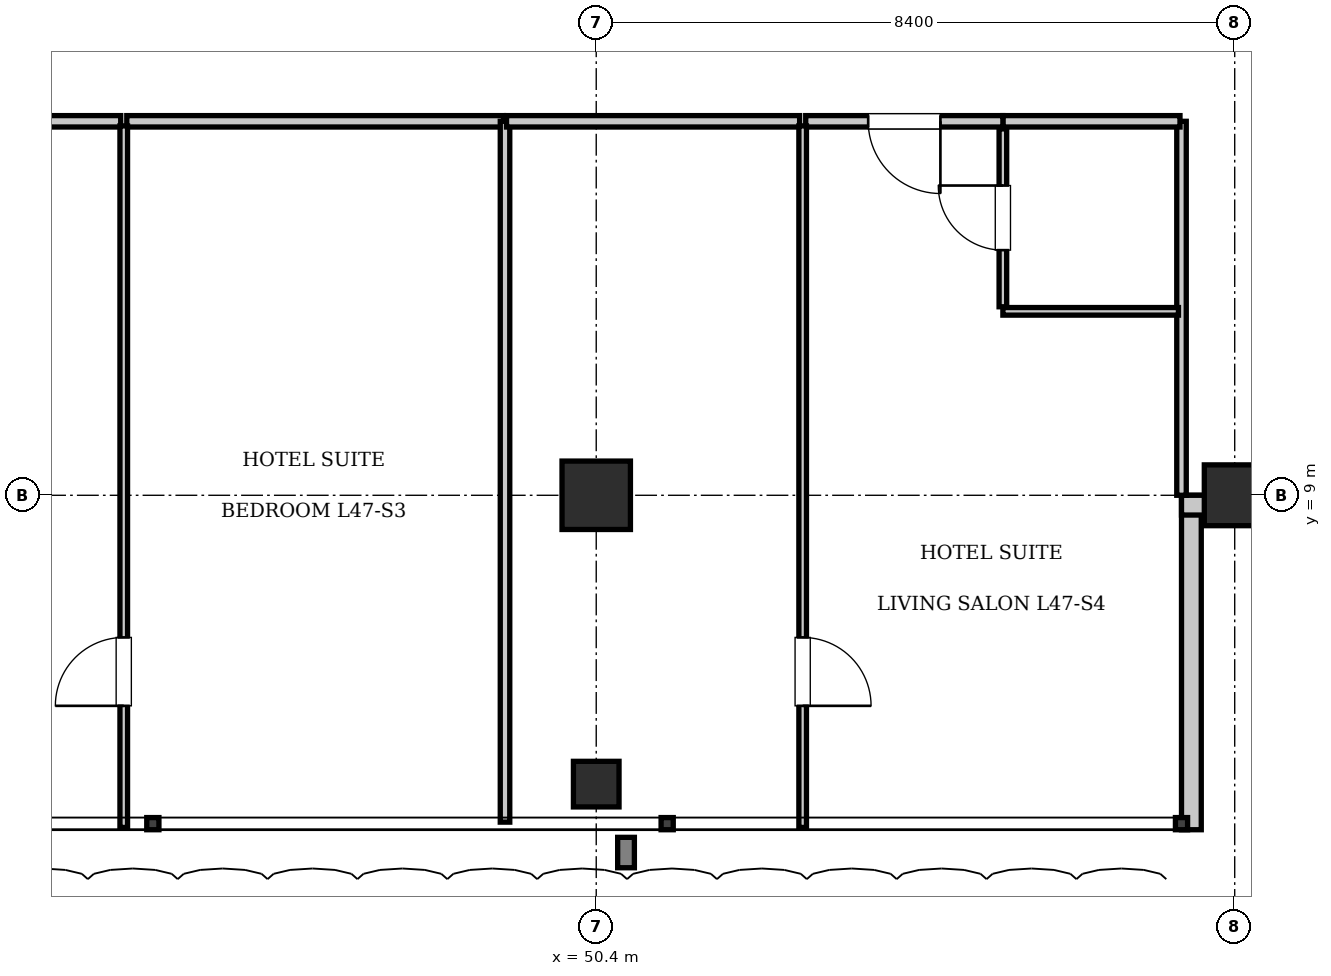
"""IFC4 building model, lengths in metres.
Left out: names, types, materials, properties, quantities, classifications, styles, units other than length and angle.
Written with IfcOpenShell. Run it as: python <this file> out.ifc"""

import sys

from ifc_helpers import new_model, si_unit, direction, frame, frame_2d, origin, origin_2d, place, context, subcontext, project, spatial, rectangle, i_section, extrude, element, fill, save


model = new_model("IFC4")
c1 = context("Model", 3, precision=1e-05, world=origin(), true_north=direction((0.0, 1.0)))
c2 = subcontext(c1, "Body", "Model", "MODEL_VIEW")
j1 = project(units=[si_unit("LENGTHUNIT", "METRE"), si_unit("PLANEANGLEUNIT", "RADIAN")], contexts=[c1])
p1 = place(None, origin())
s1 = spatial("IfcSite", under=j1, at=p1, CompositionType="ELEMENT")
p2 = place(p1, origin())
s2 = spatial("IfcBuilding", under=s1, at=p2, CompositionType="ELEMENT")
p3 = place(p2, frame((0.0, 0.0, 192.85)))
s3 = spatial("IfcBuildingStorey", under=s2, at=p3, CompositionType="ELEMENT", Elevation=192.85)
p4 = place(p3, frame((50.4, 9.0, 0.0), z_axis=(0.0, 0.0, 1.0), x_axis=(1.0, 0.0, 0.0)))
e1 = element("IfcColumn", 1, at=p4, inside=s3, PredefinedType="COLUMN", context=c2, shape_type="SweptSolid", body=[
    extrude(rectangle(XDim=0.9, YDim=0.9, at=origin_2d()), origin(), (0.0, 0.0, 1.0), 3.85),
])
p5 = place(p3, frame((58.8, 9.0, 0.0), z_axis=(0.0, 0.0, 1.0), x_axis=(1.0, 0.0, 0.0)))
e2 = element("IfcColumn", 2, at=p5, inside=s3, PredefinedType="COLUMN", context=c2, shape_type="SweptSolid", body=[
    extrude(rectangle(XDim=0.8, YDim=0.8, at=origin_2d()), origin(), (0.0, 0.0, 1.0), 3.85),
])
p6 = place(p3, frame((50.4, 5.2, 0.0), z_axis=(0.0, 0.0, 1.0), x_axis=(1.0, 0.0, 0.0)))
e3 = element("IfcColumn", 3, at=p6, inside=s3, PredefinedType="COLUMN", context=c2, shape_type="SweptSolid", body=[
    extrude(i_section(OverallWidth=0.6, OverallDepth=0.6, WebThickness=0.025, FlangeThickness=0.038, at=origin_2d()), origin(), (0.0, 0.0, 1.0), 3.85),
])
p7 = place(p3, frame((58.23, 9.0, 0.0), z_axis=(0.0, 0.0, 1.0), x_axis=(0.0, -1.0, 0.0)))
e4 = element("IfcWall", 4, at=p7, inside=s3, PredefinedType="SOLIDWALL", context=c2, shape_type="SweptSolid", body=[
    extrude(rectangle(XDim=4.4, YDim=0.26, at=frame_2d((2.2, 0.0))), origin(), (0.0, 0.0, 1.0), 3.61),
])
p8 = place(p3, frame((62.5, 8.87, 0.0), z_axis=(0.0, 0.0, 1.0), x_axis=(-1.0, 0.0, 0.0)))
e5 = element("IfcWall", 5, at=p8, inside=s3, PredefinedType="SOLIDWALL", context=c2, shape_type="SweptSolid", body=[
    extrude(rectangle(XDim=4.4, YDim=0.26, at=frame_2d((2.2, 0.0))), origin(), (0.0, 0.0, 1.0), 3.071),
])
p9 = place(p8, frame((1.3, 0.0, 0.9)))
e6 = element("IfcOpeningElement", 6, at=p9, cuts=e5, PredefinedType="OPENING", context=c2, shape_type="SweptSolid", body=[
    extrude(rectangle(XDim=1.8, YDim=2.1, at=frame_2d((0.9, 1.05))), frame((0.0, 0.14, 0.0), z_axis=(0.0, -1.0, 0.0), x_axis=(1.0, 0.0, 0.0)), (0.0, 0.0, 1.0), 0.28),
])
p10 = place(p3, frame((58.1, 9.0, 0.0), z_axis=(0.0, 0.0, 1.0), x_axis=(0.0, 1.0, 0.0)))
e7 = element("IfcWall", 7, at=p10, inside=s3, PredefinedType="PARTITIONING", context=c2, shape_type="SweptSolid", body=[
    extrude(rectangle(XDim=4.92, YDim=0.125, at=frame_2d((2.46, 0.0))), origin(), (0.0, 0.0, 1.0), 3.61),
])
p11 = place(p3, frame((40.15, 13.92, 0.0), z_axis=(0.0, 0.0, 1.0), x_axis=(1.0, 0.0, 0.0)))
e8 = element("IfcWall", 8, at=p11, inside=s3, PredefinedType="PARTITIONING", context=c2, shape_type="SweptSolid", body=[
    extrude(rectangle(XDim=3.994, YDim=0.15, at=frame_2d((1.997, 0.0))), origin(), (0.0, 0.0, 1.0), 3.61),
])
p12 = place(p11, frame((1.522, 0.0, 0.0)))
e9 = element("IfcOpeningElement", 9, at=p12, cuts=e8, PredefinedType="OPENING", context=c2, shape_type="SweptSolid", body=[
    extrude(rectangle(XDim=0.95, YDim=2.15, at=frame_2d((0.475, 1.075))), frame((0.0, 0.085, 0.0), z_axis=(0.0, -1.0, 0.0), x_axis=(1.0, 0.0, 0.0)), (0.0, 0.0, 1.0), 0.17),
])
p13 = place(p3, frame((44.224, 13.92, 0.0), z_axis=(0.0, 0.0, 1.0), x_axis=(1.0, 0.0, 0.0)))
e10 = element("IfcWall", 10, at=p13, inside=s3, PredefinedType="PARTITIONING", context=c2, shape_type="SweptSolid", body=[
    extrude(rectangle(XDim=4.956, YDim=0.15, at=frame_2d((2.478, 0.0))), origin(), (0.0, 0.0, 1.0), 3.61),
])
p14 = place(p3, frame((44.184, 4.63, 0.0), z_axis=(0.0, 0.0, 1.0), x_axis=(0.0, 1.0, 0.0)))
e11 = element("IfcWall", 11, at=p14, inside=s3, PredefinedType="PARTITIONING", context=c2, shape_type="SweptSolid", body=[
    extrude(rectangle(XDim=9.23, YDim=0.1, at=frame_2d((4.615, 0.0))), origin(), (0.0, 0.0, 1.0), 3.61),
])
p15 = place(p14, frame((1.6, 0.0, 0.0)))
e12 = element("IfcOpeningElement", 12, at=p15, cuts=e11, PredefinedType="OPENING", context=c2, shape_type="SweptSolid", body=[
    extrude(rectangle(XDim=0.9, YDim=2.1, at=frame_2d((0.45, 1.05))), frame((0.0, 0.06, 0.0), z_axis=(0.0, -1.0, 0.0), x_axis=(1.0, 0.0, 0.0)), (0.0, 0.0, 1.0), 0.12),
])
p16 = place(p3, frame((49.2, 4.7, 0.0), z_axis=(0.0, 0.0, 1.0), x_axis=(0.0, 1.0, 0.0)))
e13 = element("IfcWall", 13, at=p16, inside=s3, PredefinedType="PARTITIONING", context=c2, shape_type="SweptSolid", body=[
    extrude(rectangle(XDim=9.22, YDim=0.125, at=frame_2d((4.61, 0.0))), origin(), (0.0, 0.0, 1.0), 3.61),
])
p17 = place(p3, frame((55.75, 13.92, 0.0), z_axis=(0.0, 0.0, 1.0), x_axis=(1.0, 0.0, 0.0)))
e14 = element("IfcWall", 14, at=p17, inside=s3, PredefinedType="PARTITIONING", context=c2, shape_type="SweptSolid", body=[
    extrude(rectangle(XDim=2.33, YDim=0.15, at=frame_2d((1.165, 0.0))), origin(), (0.0, 0.0, 1.0), 3.61),
])
p18 = place(p3, frame((55.75, 11.42, 0.0), z_axis=(0.0, 0.0, 1.0), x_axis=(1.0, 0.0, 0.0)))
e15 = element("IfcWall", 15, at=p18, inside=s3, PredefinedType="PARTITIONING", context=c2, shape_type="SweptSolid", body=[
    extrude(rectangle(XDim=2.31, YDim=0.1, at=frame_2d((1.155, 0.0))), origin(), (0.0, 0.0, 1.0), 3.61),
])
p19 = place(p3, frame((55.75, 11.48, 0.0), z_axis=(0.0, 0.0, 1.0), x_axis=(0.0, 1.0, 0.0)))
e16 = element("IfcWall", 16, at=p19, inside=s3, PredefinedType="PARTITIONING", context=c2, shape_type="SweptSolid", body=[
    extrude(rectangle(XDim=2.34, YDim=0.1, at=frame_2d((1.17, 0.0))), origin(), (0.0, 0.0, 1.0), 3.61),
])
p20 = place(p19, frame((0.745, 0.0, 0.0)))
e17 = element("IfcOpeningElement", 17, at=p20, cuts=e16, PredefinedType="OPENING", context=c2, shape_type="SweptSolid", body=[
    extrude(rectangle(XDim=0.85, YDim=2.1, at=frame_2d((0.425, 1.05))), frame((0.0, 0.06, 0.0), z_axis=(0.0, -1.0, 0.0), x_axis=(1.0, 0.0, 0.0)), (0.0, 0.0, 1.0), 0.12),
])
p21 = place(p3, frame((49.22, 13.92, 0.0), z_axis=(0.0, 0.0, 1.0), x_axis=(1.0, 0.0, 0.0)))
e18 = element("IfcWall", 18, at=p21, inside=s3, PredefinedType="PARTITIONING", context=c2, shape_type="SweptSolid", body=[
    extrude(rectangle(XDim=3.856, YDim=0.15, at=frame_2d((1.928, 0.0))), origin(), (0.0, 0.0, 1.0), 3.61),
])
p22 = place(p3, frame((53.156, 13.92, 0.0), z_axis=(0.0, 0.0, 1.0), x_axis=(1.0, 0.0, 0.0)))
e19 = element("IfcWall", 19, at=p22, inside=s3, PredefinedType="PARTITIONING", context=c2, shape_type="SweptSolid", body=[
    extrude(rectangle(XDim=2.594, YDim=0.15, at=frame_2d((1.297, 0.0))), origin(), (0.0, 0.0, 1.0), 3.61),
])
p23 = place(p22, frame((0.822, 0.0, 0.0)))
e20 = element("IfcOpeningElement", 20, at=p23, cuts=e19, PredefinedType="OPENING", context=c2, shape_type="SweptSolid", body=[
    extrude(rectangle(XDim=0.95, YDim=2.15, at=frame_2d((0.475, 1.075))), frame((0.0, 0.085, 0.0), z_axis=(0.0, -1.0, 0.0), x_axis=(1.0, 0.0, 0.0)), (0.0, 0.0, 1.0), 0.17),
])
p24 = place(p3, frame((53.116, 4.63, 0.0), z_axis=(0.0, 0.0, 1.0), x_axis=(0.0, 1.0, 0.0)))
e21 = element("IfcWall", 21, at=p24, inside=s3, PredefinedType="PARTITIONING", context=c2, shape_type="SweptSolid", body=[
    extrude(rectangle(XDim=9.23, YDim=0.1, at=frame_2d((4.615, 0.0))), origin(), (0.0, 0.0, 1.0), 3.61),
])
p25 = place(p24, frame((1.6, 0.0, 0.0)))
e22 = element("IfcOpeningElement", 22, at=p25, cuts=e21, PredefinedType="OPENING", context=c2, shape_type="SweptSolid", body=[
    extrude(rectangle(XDim=0.9, YDim=2.1, at=frame_2d((0.45, 1.05))), frame((0.0, 0.06, 0.0), z_axis=(0.0, -1.0, 0.0), x_axis=(1.0, 0.0, 0.0)), (0.0, 0.0, 1.0), 0.12),
])
p26 = place(p15, origin())
e23 = element("IfcDoor", 23, at=p26, inside=s3, OperationType="SINGLE_SWING_LEFT", PredefinedType="DOOR", context=c2, shape_type="SweptSolid", body=[
    extrude(rectangle(XDim=0.9, YDim=2.1, at=frame_2d((0.45, 1.05))), frame((0.0, 0.025, 0.0), z_axis=(0.0, -1.0, 0.0), x_axis=(1.0, 0.0, 0.0)), (0.0, 0.0, 1.0), 0.05),
])
fill(e12, e23)
p27 = place(p20, origin())
e24 = element("IfcDoor", 24, at=p27, inside=s3, OperationType="SINGLE_SWING_RIGHT", PredefinedType="DOOR", context=c2, shape_type="SweptSolid", body=[
    extrude(rectangle(XDim=0.85, YDim=2.1, at=frame_2d((0.425, 1.05))), frame((0.0, 0.025, 0.0), z_axis=(0.0, -1.0, 0.0), x_axis=(1.0, 0.0, 0.0)), (0.0, 0.0, 1.0), 0.05),
])
fill(e17, e24)
p28 = place(p23, frame((0.95, 0.0, 0.0), z_axis=(0.0, 0.0, 1.0), x_axis=(-1.0, 0.0, 0.0)))
e25 = element("IfcDoor", 25, at=p28, inside=s3, OperationType="SINGLE_SWING_LEFT", PredefinedType="DOOR", context=c2, shape_type="SweptSolid", body=[
    extrude(rectangle(XDim=0.95, YDim=2.15, at=frame_2d((0.475, 1.075))), frame((0.0, 0.025, 0.0), z_axis=(0.0, -1.0, 0.0), x_axis=(1.0, 0.0, 0.0)), (0.0, 0.0, 1.0), 0.05),
])
fill(e20, e25)
p29 = place(p25, frame((0.9, 0.0, 0.0), z_axis=(0.0, 0.0, 1.0), x_axis=(-1.0, 0.0, 0.0)))
e26 = element("IfcDoor", 26, at=p29, inside=s3, OperationType="SINGLE_SWING_RIGHT", PredefinedType="DOOR", context=c2, shape_type="SweptSolid", body=[
    extrude(rectangle(XDim=0.9, YDim=2.1, at=frame_2d((0.45, 1.05))), frame((0.0, 0.025, 0.0), z_axis=(0.0, -1.0, 0.0), x_axis=(1.0, 0.0, 0.0)), (0.0, 0.0, 1.0), 0.05),
])
fill(e22, e26)
save(model, sys.argv[1])
